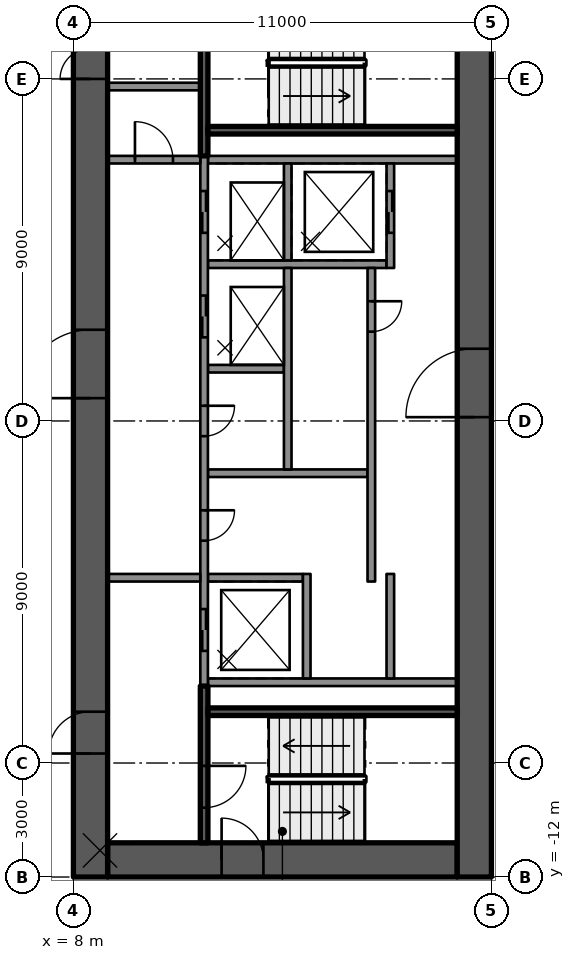
"""IFC4 building model, lengths in metres.
Left out: names, types, materials, properties, quantities, classifications, styles, units other than length and angle.
Written with IfcOpenShell. Run it as: python <this file> out.ifc"""

import sys

from ifc_helpers import new_model, si_unit, direction, frame, frame_2d, origin, place, context, subcontext, project, spatial, rectangle, extrude, element, fill, save


model = new_model("IFC4")
c1 = context("Model", 3, precision=1e-05, world=origin(), true_north=direction((0.0, 1.0)))
c2 = subcontext(c1, "Body", "Model", "MODEL_VIEW")
j1 = project(units=[si_unit("LENGTHUNIT", "METRE"), si_unit("PLANEANGLEUNIT", "RADIAN")], contexts=[c1])
p1 = place(None, origin())
s1 = spatial("IfcSite", under=j1, at=p1, CompositionType="ELEMENT")
p2 = place(p1, origin())
s2 = spatial("IfcBuilding", under=s1, at=p2, CompositionType="ELEMENT")
p3 = place(p2, frame((0.0, 0.0, 289.4)))
s3 = spatial("IfcBuildingStorey", under=s2, at=p3, CompositionType="ELEMENT", Elevation=289.4)
p4 = place(p3, frame((8.9, -11.55, 0.0), z_axis=(0.0, 0.0, 1.0), x_axis=(1.0, 0.0, 0.0)))
e1 = element("IfcWall", 1, at=p4, inside=s3, PredefinedType="SHEAR", context=c2, shape_type="SweptSolid", body=[
    extrude(rectangle(XDim=9.2, YDim=0.9, at=frame_2d((4.6, 0.0))), origin(), (0.0, 0.0, 1.0), 3.5),
])
p5 = place(p4, frame((3.0, 0.0, 0.0)))
e2 = element("IfcOpeningElement", 2, at=p5, cuts=e1, PredefinedType="OPENING", context=c2, shape_type="SweptSolid", body=[
    extrude(rectangle(XDim=1.1, YDim=2.1, at=frame_2d((0.55, 1.05))), frame((0.0, 0.46, 0.0), z_axis=(0.0, -1.0, 0.0), x_axis=(1.0, 0.0, 0.0)), (0.0, 0.0, 1.0), 0.92),
])
p6 = place(p3, frame((8.45, -12.0, 0.0), z_axis=(0.0, 0.0, 1.0), x_axis=(0.0, 1.0, 0.0)))
e3 = element("IfcWall", 3, at=p6, inside=s3, PredefinedType="SHEAR", context=c2, shape_type="SweptSolid", body=[
    extrude(rectangle(XDim=24.0, YDim=0.9, at=frame_2d((12.0, 0.0))), origin(), (0.0, 0.0, 1.0), 3.5),
])
p7 = place(p6, frame((12.6, 0.0, 0.0)))
e4 = element("IfcOpeningElement", 4, at=p7, cuts=e3, PredefinedType="OPENING", context=c2, shape_type="SweptSolid", body=[
    extrude(rectangle(XDim=1.8, YDim=2.1, at=frame_2d((0.9, 1.05))), frame((0.0, 0.46, 0.0), z_axis=(0.0, -1.0, 0.0), x_axis=(1.0, 0.0, 0.0)), (0.0, 0.0, 1.0), 0.92),
])
p8 = place(p6, frame((3.25, 0.0, 0.0)))
e5 = element("IfcOpeningElement", 5, at=p8, cuts=e3, PredefinedType="OPENING", context=c2, shape_type="SweptSolid", body=[
    extrude(rectangle(XDim=1.1, YDim=2.1, at=frame_2d((0.55, 1.05))), frame((0.0, 0.46, 0.0), z_axis=(0.0, -1.0, 0.0), x_axis=(1.0, 0.0, 0.0)), (0.0, 0.0, 1.0), 0.92),
])
p9 = place(p6, frame((21.0, 0.0, 0.0)))
e6 = element("IfcOpeningElement", 6, at=p9, cuts=e3, PredefinedType="OPENING", context=c2, shape_type="SweptSolid", body=[
    extrude(rectangle(XDim=0.8, YDim=2.1, at=frame_2d((0.4, 1.05))), frame((0.0, 0.46, 0.0), z_axis=(0.0, -1.0, 0.0), x_axis=(1.0, 0.0, 0.0)), (0.0, 0.0, 1.0), 0.92),
])
p10 = place(p3, frame((18.55, -12.0, 0.0), z_axis=(0.0, 0.0, 1.0), x_axis=(0.0, 1.0, 0.0)))
e7 = element("IfcWall", 7, at=p10, inside=s3, PredefinedType="SHEAR", context=c2, shape_type="SweptSolid", body=[
    extrude(rectangle(XDim=24.0, YDim=0.9, at=frame_2d((12.0, 0.0))), origin(), (0.0, 0.0, 1.0), 3.5),
])
p11 = place(p10, frame((12.1, 0.0, 0.0)))
e8 = element("IfcOpeningElement", 8, at=p11, cuts=e7, PredefinedType="OPENING", context=c2, shape_type="SweptSolid", body=[
    extrude(rectangle(XDim=1.8, YDim=2.1, at=frame_2d((0.9, 1.05))), frame((0.0, 0.46, 0.0), z_axis=(0.0, -1.0, 0.0), x_axis=(1.0, 0.0, 0.0)), (0.0, 0.0, 1.0), 0.92),
])
for number, where, z_axis, x_axis in (
    (9, (11.54, -6.875, 0.0), (0.0, 0.0, 1.0), (1.0, 0.0, 0.0)),
    (10, (11.54, 6.875, 0.0), (0.0, 0.0, 1.0), (1.0, 0.0, 0.0)),
):
    element("IfcWall", number, at=place(p3, frame(where, z_axis=z_axis, x_axis=x_axis)), inside=s3, PredefinedType="SOLIDWALL", context=c2, shape_type="SweptSolid", body=[
        extrude(rectangle(XDim=6.56, YDim=0.2, at=frame_2d((3.28, 0.0))), origin(), (0.0, 0.0, 1.0), 3.09),
    ])
p12 = place(p3, frame((11.54, 4.125, 0.0), z_axis=(0.0, 0.0, 1.0), x_axis=(1.0, 0.0, 0.0)))
e11 = element("IfcWall", 11, at=p12, inside=s3, PredefinedType="SOLIDWALL", context=c2, shape_type="SweptSolid", body=[
    extrude(rectangle(XDim=4.7, YDim=0.2, at=frame_2d((2.35, 0.0))), origin(), (0.0, 0.0, 1.0), 3.09),
])
p13 = place(p3, frame((11.54, 1.375, 0.0), z_axis=(0.0, 0.0, 1.0), x_axis=(1.0, 0.0, 0.0)))
e12 = element("IfcWall", 12, at=p13, inside=s3, PredefinedType="SOLIDWALL", context=c2, shape_type="SweptSolid", body=[
    extrude(rectangle(XDim=2.0, YDim=0.2, at=frame_2d((1.0, 0.0))), origin(), (0.0, 0.0, 1.0), 3.09),
])
p14 = place(p3, frame((11.54, -1.375, 0.0), z_axis=(0.0, 0.0, 1.0), x_axis=(1.0, 0.0, 0.0)))
e13 = element("IfcWall", 13, at=p14, inside=s3, PredefinedType="SOLIDWALL", context=c2, shape_type="SweptSolid", body=[
    extrude(rectangle(XDim=4.2, YDim=0.2, at=frame_2d((2.1, 0.0))), origin(), (0.0, 0.0, 1.0), 3.09),
])
p15 = place(p3, frame((11.54, -4.125, 0.0), z_axis=(0.0, 0.0, 1.0), x_axis=(1.0, 0.0, 0.0)))
e14 = element("IfcWall", 14, at=p15, inside=s3, PredefinedType="SOLIDWALL", context=c2, shape_type="SweptSolid", body=[
    extrude(rectangle(XDim=2.5, YDim=0.2, at=frame_2d((1.25, 0.0))), origin(), (0.0, 0.0, 1.0), 3.09),
])
p16 = place(p3, frame((11.44, 6.975, 0.0), z_axis=(0.0, 0.0, 1.0), x_axis=(0.0, -1.0, 0.0)))
e15 = element("IfcWall", 15, at=p16, inside=s3, PredefinedType="SOLIDWALL", context=c2, shape_type="SweptSolid", body=[
    extrude(rectangle(XDim=13.95, YDim=0.2, at=frame_2d((6.975, 0.0))), origin(), (0.0, 0.0, 1.0), 3.09),
])
p17 = place(p16, frame((0.925, 0.0, 0.0)))
e16 = element("IfcOpeningElement", 16, at=p17, cuts=e15, PredefinedType="OPENING", context=c2, shape_type="SweptSolid", body=[
    extrude(rectangle(XDim=1.1, YDim=2.1, at=frame_2d((0.55, 1.05))), frame((0.0, 0.11, 0.0), z_axis=(0.0, -1.0, 0.0), x_axis=(1.0, 0.0, 0.0)), (0.0, 0.0, 1.0), 0.22),
])
p18 = place(p16, frame((3.675, 0.0, 0.0)))
e17 = element("IfcOpeningElement", 17, at=p18, cuts=e15, PredefinedType="OPENING", context=c2, shape_type="SweptSolid", body=[
    extrude(rectangle(XDim=1.1, YDim=2.1, at=frame_2d((0.55, 1.05))), frame((0.0, 0.11, 0.0), z_axis=(0.0, -1.0, 0.0), x_axis=(1.0, 0.0, 0.0)), (0.0, 0.0, 1.0), 0.22),
])
p19 = place(p16, frame((11.925, 0.0, 0.0)))
e18 = element("IfcOpeningElement", 18, at=p19, cuts=e15, PredefinedType="OPENING", context=c2, shape_type="SweptSolid", body=[
    extrude(rectangle(XDim=1.1, YDim=2.1, at=frame_2d((0.55, 1.05))), frame((0.0, 0.11, 0.0), z_axis=(0.0, -1.0, 0.0), x_axis=(1.0, 0.0, 0.0)), (0.0, 0.0, 1.0), 0.22),
])
p20 = place(p16, frame((6.575, 0.0, 0.0)))
e19 = element("IfcOpeningElement", 19, at=p20, cuts=e15, PredefinedType="OPENING", context=c2, shape_type="SweptSolid", body=[
    extrude(rectangle(XDim=0.8, YDim=2.1, at=frame_2d((0.4, 1.05))), frame((0.0, 0.11, 0.0), z_axis=(0.0, -1.0, 0.0), x_axis=(1.0, 0.0, 0.0)), (0.0, 0.0, 1.0), 0.22),
])
p21 = place(p16, frame((9.325, 0.0, 0.0)))
e20 = element("IfcOpeningElement", 20, at=p21, cuts=e15, PredefinedType="OPENING", context=c2, shape_type="SweptSolid", body=[
    extrude(rectangle(XDim=0.8, YDim=2.1, at=frame_2d((0.4, 1.05))), frame((0.0, 0.11, 0.0), z_axis=(0.0, -1.0, 0.0), x_axis=(1.0, 0.0, 0.0)), (0.0, 0.0, 1.0), 0.22),
])
p22 = place(p3, frame((13.64, 6.775, 0.0), z_axis=(0.0, 0.0, 1.0), x_axis=(0.0, -1.0, 0.0)))
e21 = element("IfcWall", 21, at=p22, inside=s3, PredefinedType="SOLIDWALL", context=c2, shape_type="SweptSolid", body=[
    extrude(rectangle(XDim=2.55, YDim=0.2, at=frame_2d((1.275, 0.0))), origin(), (0.0, 0.0, 1.0), 3.09),
])
p23 = place(p3, frame((13.64, 4.025, 0.0), z_axis=(0.0, 0.0, 1.0), x_axis=(0.0, -1.0, 0.0)))
e22 = element("IfcWall", 22, at=p23, inside=s3, PredefinedType="SOLIDWALL", context=c2, shape_type="SweptSolid", body=[
    extrude(rectangle(XDim=5.3, YDim=0.2, at=frame_2d((2.65, 0.0))), origin(), (0.0, 0.0, 1.0), 3.09),
])
p24 = place(p3, frame((14.14, -4.025, 0.0), z_axis=(0.0, 0.0, 1.0), x_axis=(0.0, -1.0, 0.0)))
e23 = element("IfcWall", 23, at=p24, inside=s3, PredefinedType="SOLIDWALL", context=c2, shape_type="SweptSolid", body=[
    extrude(rectangle(XDim=2.75, YDim=0.2, at=frame_2d((1.375, 0.0))), origin(), (0.0, 0.0, 1.0), 3.09),
])
p25 = place(p3, frame((16.34, 6.775, 0.0), z_axis=(0.0, 0.0, 1.0), x_axis=(0.0, -1.0, 0.0)))
e24 = element("IfcWall", 24, at=p25, inside=s3, PredefinedType="SOLIDWALL", context=c2, shape_type="SweptSolid", body=[
    extrude(rectangle(XDim=2.75, YDim=0.2, at=frame_2d((1.375, 0.0))), origin(), (0.0, 0.0, 1.0), 3.09),
])
p26 = place(p25, frame((0.725, 0.0, 0.0)))
e25 = element("IfcOpeningElement", 25, at=p26, cuts=e24, PredefinedType="OPENING", context=c2, shape_type="SweptSolid", body=[
    extrude(rectangle(XDim=1.1, YDim=2.1, at=frame_2d((0.55, 1.05))), frame((0.0, 0.11, 0.0), z_axis=(0.0, -1.0, 0.0), x_axis=(1.0, 0.0, 0.0)), (0.0, 0.0, 1.0), 0.22),
])
p27 = place(p3, frame((15.84, 4.025, 0.0), z_axis=(0.0, 0.0, 1.0), x_axis=(0.0, -1.0, 0.0)))
e26 = element("IfcWall", 26, at=p27, inside=s3, PredefinedType="SOLIDWALL", context=c2, shape_type="SweptSolid", body=[
    extrude(rectangle(XDim=8.25, YDim=0.2, at=frame_2d((4.125, 0.0))), origin(), (0.0, 0.0, 1.0), 3.09),
])
p28 = place(p27, frame((0.875, 0.0, 0.0)))
e27 = element("IfcOpeningElement", 27, at=p28, cuts=e26, PredefinedType="OPENING", context=c2, shape_type="SweptSolid", body=[
    extrude(rectangle(XDim=0.8, YDim=2.1, at=frame_2d((0.4, 1.05))), frame((0.0, 0.11, 0.0), z_axis=(0.0, -1.0, 0.0), x_axis=(1.0, 0.0, 0.0)), (0.0, 0.0, 1.0), 0.22),
])
p29 = place(p3, frame((16.34, -4.025, 0.0), z_axis=(0.0, 0.0, 1.0), x_axis=(0.0, -1.0, 0.0)))
e28 = element("IfcWall", 28, at=p29, inside=s3, PredefinedType="SOLIDWALL", context=c2, shape_type="SweptSolid", body=[
    extrude(rectangle(XDim=2.75, YDim=0.2, at=frame_2d((1.375, 0.0))), origin(), (0.0, 0.0, 1.0), 3.09),
])
p30 = place(p3, frame((11.44, -6.975, 0.0), z_axis=(0.0, 0.0, 1.0), x_axis=(0.0, -1.0, 0.0)))
e29 = element("IfcWall", 29, at=p30, inside=s3, PredefinedType="SOLIDWALL", context=c2, shape_type="SweptSolid", body=[
    extrude(rectangle(XDim=4.125, YDim=0.2, at=frame_2d((2.062, 0.0))), origin(), (0.0, 0.0, 1.0), 3.09),
])
p31 = place(p30, frame((2.1, 0.0, 0.0)))
e30 = element("IfcOpeningElement", 30, at=p31, cuts=e29, PredefinedType="OPENING", context=c2, shape_type="SweptSolid", body=[
    extrude(rectangle(XDim=1.1, YDim=2.1, at=frame_2d((0.55, 1.05))), frame((0.0, 0.11, 0.0), z_axis=(0.0, -1.0, 0.0), x_axis=(1.0, 0.0, 0.0)), (0.0, 0.0, 1.0), 0.22),
])
p32 = place(p3, frame((11.54, -7.65, 0.0), z_axis=(0.0, 0.0, 1.0), x_axis=(1.0, 0.0, 0.0)))
e31 = element("IfcWall", 31, at=p32, inside=s3, PredefinedType="SOLIDWALL", context=c2, shape_type="SweptSolid", body=[
    extrude(rectangle(XDim=6.56, YDim=0.2, at=frame_2d((3.28, 0.0))), origin(), (0.0, 0.0, 1.0), 3.09),
])
p33 = place(p3, frame((11.44, 11.1, 0.0), z_axis=(0.0, 0.0, 1.0), x_axis=(0.0, -1.0, 0.0)))
e32 = element("IfcWall", 32, at=p33, inside=s3, PredefinedType="SOLIDWALL", context=c2, shape_type="SweptSolid", body=[
    extrude(rectangle(XDim=4.125, YDim=0.2, at=frame_2d((2.062, 0.0))), origin(), (0.0, 0.0, 1.0), 3.09),
])
p34 = place(p3, frame((11.54, 7.65, 0.0), z_axis=(0.0, 0.0, 1.0), x_axis=(1.0, 0.0, 0.0)))
e33 = element("IfcWall", 33, at=p34, inside=s3, PredefinedType="SOLIDWALL", context=c2, shape_type="SweptSolid", body=[
    extrude(rectangle(XDim=6.56, YDim=0.2, at=frame_2d((3.28, 0.0))), origin(), (0.0, 0.0, 1.0), 3.09),
])
p35 = place(p3, frame((8.9, -4.125, 0.0), z_axis=(0.0, 0.0, 1.0), x_axis=(1.0, 0.0, 0.0)))
e34 = element("IfcWall", 34, at=p35, inside=s3, PredefinedType="PARTITIONING", context=c2, shape_type="SweptSolid", body=[
    extrude(rectangle(XDim=2.44, YDim=0.2, at=frame_2d((1.22, 0.0))), origin(), (0.0, 0.0, 1.0), 3.09),
])
p36 = place(p3, frame((8.9, 6.875, 0.0), z_axis=(0.0, 0.0, 1.0), x_axis=(1.0, 0.0, 0.0)))
e35 = element("IfcWall", 35, at=p36, inside=s3, PredefinedType="PARTITIONING", context=c2, shape_type="SweptSolid", body=[
    extrude(rectangle(XDim=2.44, YDim=0.2, at=frame_2d((1.22, 0.0))), origin(), (0.0, 0.0, 1.0), 3.09),
])
p37 = place(p36, frame((0.72, 0.0, 0.0)))
e36 = element("IfcOpeningElement", 36, at=p37, cuts=e35, PredefinedType="OPENING", context=c2, shape_type="SweptSolid", body=[
    extrude(rectangle(XDim=1.0, YDim=2.1, at=frame_2d((0.5, 1.05))), frame((0.0, 0.11, 0.0), z_axis=(0.0, -1.0, 0.0), x_axis=(1.0, 0.0, 0.0)), (0.0, 0.0, 1.0), 0.22),
])
p38 = place(p3, frame((8.9, 8.8, 0.0), z_axis=(0.0, 0.0, 1.0), x_axis=(1.0, 0.0, 0.0)))
e37 = element("IfcWall", 37, at=p38, inside=s3, PredefinedType="PARTITIONING", context=c2, shape_type="SweptSolid", body=[
    extrude(rectangle(XDim=2.44, YDim=0.2, at=frame_2d((1.22, 0.0))), origin(), (0.0, 0.0, 1.0), 3.09),
])
p39 = place(p17, origin())
e38 = element("IfcDoor", 38, at=p39, inside=s3, OperationType="DOUBLE_DOOR_SLIDING", PredefinedType="DOOR", context=c2, shape_type="SweptSolid", body=[
    extrude(rectangle(XDim=1.1, YDim=2.1, at=frame_2d((0.55, 1.05))), frame((0.0, 0.025, 0.0), z_axis=(0.0, -1.0, 0.0), x_axis=(1.0, 0.0, 0.0)), (0.0, 0.0, 1.0), 0.05),
])
fill(e16, e38)
p40 = place(p26, origin())
e39 = element("IfcDoor", 39, at=p40, inside=s3, OperationType="DOUBLE_DOOR_SLIDING", PredefinedType="DOOR", context=c2, shape_type="SweptSolid", body=[
    extrude(rectangle(XDim=1.1, YDim=2.1, at=frame_2d((0.55, 1.05))), frame((0.0, 0.025, 0.0), z_axis=(0.0, -1.0, 0.0), x_axis=(1.0, 0.0, 0.0)), (0.0, 0.0, 1.0), 0.05),
])
fill(e25, e39)
p41 = place(p18, origin())
e40 = element("IfcDoor", 40, at=p41, inside=s3, OperationType="DOUBLE_DOOR_SLIDING", PredefinedType="DOOR", context=c2, shape_type="SweptSolid", body=[
    extrude(rectangle(XDim=1.1, YDim=2.1, at=frame_2d((0.55, 1.05))), frame((0.0, 0.025, 0.0), z_axis=(0.0, -1.0, 0.0), x_axis=(1.0, 0.0, 0.0)), (0.0, 0.0, 1.0), 0.05),
])
fill(e17, e40)
p42 = place(p19, origin())
e41 = element("IfcDoor", 41, at=p42, inside=s3, OperationType="DOUBLE_DOOR_SLIDING", PredefinedType="DOOR", context=c2, shape_type="SweptSolid", body=[
    extrude(rectangle(XDim=1.1, YDim=2.1, at=frame_2d((0.55, 1.05))), frame((0.0, 0.025, 0.0), z_axis=(0.0, -1.0, 0.0), x_axis=(1.0, 0.0, 0.0)), (0.0, 0.0, 1.0), 0.05),
])
fill(e18, e41)
p43 = place(p28, origin())
e42 = element("IfcDoor", 42, at=p43, inside=s3, OperationType="SINGLE_SWING_LEFT", PredefinedType="DOOR", context=c2, shape_type="SweptSolid", body=[
    extrude(rectangle(XDim=0.8, YDim=2.1, at=frame_2d((0.4, 1.05))), frame((0.0, 0.025, 0.0), z_axis=(0.0, -1.0, 0.0), x_axis=(1.0, 0.0, 0.0)), (0.0, 0.0, 1.0), 0.05),
])
fill(e27, e42)
p44 = place(p20, origin())
e43 = element("IfcDoor", 43, at=p44, inside=s3, OperationType="SINGLE_SWING_LEFT", PredefinedType="DOOR", context=c2, shape_type="SweptSolid", body=[
    extrude(rectangle(XDim=0.8, YDim=2.1, at=frame_2d((0.4, 1.05))), frame((0.0, 0.025, 0.0), z_axis=(0.0, -1.0, 0.0), x_axis=(1.0, 0.0, 0.0)), (0.0, 0.0, 1.0), 0.05),
])
fill(e19, e43)
p45 = place(p21, origin())
e44 = element("IfcDoor", 44, at=p45, inside=s3, OperationType="SINGLE_SWING_LEFT", PredefinedType="DOOR", context=c2, shape_type="SweptSolid", body=[
    extrude(rectangle(XDim=0.8, YDim=2.1, at=frame_2d((0.4, 1.05))), frame((0.0, 0.025, 0.0), z_axis=(0.0, -1.0, 0.0), x_axis=(1.0, 0.0, 0.0)), (0.0, 0.0, 1.0), 0.05),
])
fill(e20, e44)
p46 = place(p7, origin())
e45 = element("IfcDoor", 45, at=p46, inside=s3, OperationType="SINGLE_SWING_RIGHT", PredefinedType="DOOR", context=c2, shape_type="SweptSolid", body=[
    extrude(rectangle(XDim=1.8, YDim=2.1, at=frame_2d((0.9, 1.05))), frame((0.0, 0.025, 0.0), z_axis=(0.0, -1.0, 0.0), x_axis=(1.0, 0.0, 0.0)), (0.0, 0.0, 1.0), 0.05),
])
fill(e4, e45)
p47 = place(p11, origin())
e46 = element("IfcDoor", 46, at=p47, inside=s3, OperationType="SINGLE_SWING_RIGHT", PredefinedType="DOOR", context=c2, shape_type="SweptSolid", body=[
    extrude(rectangle(XDim=1.8, YDim=2.1, at=frame_2d((0.9, 1.05))), frame((0.0, 0.025, 0.0), z_axis=(0.0, -1.0, 0.0), x_axis=(1.0, 0.0, 0.0)), (0.0, 0.0, 1.0), 0.05),
])
fill(e8, e46)
p48 = place(p8, origin())
e47 = element("IfcDoor", 47, at=p48, inside=s3, OperationType="SINGLE_SWING_LEFT", PredefinedType="DOOR", context=c2, shape_type="SweptSolid", body=[
    extrude(rectangle(XDim=1.1, YDim=2.1, at=frame_2d((0.55, 1.05))), frame((0.0, 0.025, 0.0), z_axis=(0.0, -1.0, 0.0), x_axis=(1.0, 0.0, 0.0)), (0.0, 0.0, 1.0), 0.05),
])
fill(e5, e47)
p49 = place(p5, origin())
e48 = element("IfcDoor", 48, at=p49, inside=s3, OperationType="SINGLE_SWING_LEFT", PredefinedType="DOOR", context=c2, shape_type="SweptSolid", body=[
    extrude(rectangle(XDim=1.1, YDim=2.1, at=frame_2d((0.55, 1.05))), frame((0.0, 0.025, 0.0), z_axis=(0.0, -1.0, 0.0), x_axis=(1.0, 0.0, 0.0)), (0.0, 0.0, 1.0), 0.05),
])
fill(e2, e48)
p50 = place(p31, origin())
e49 = element("IfcDoor", 49, at=p50, inside=s3, OperationType="SINGLE_SWING_RIGHT", PredefinedType="DOOR", context=c2, shape_type="SweptSolid", body=[
    extrude(rectangle(XDim=1.1, YDim=2.1, at=frame_2d((0.55, 1.05))), frame((0.0, 0.025, 0.0), z_axis=(0.0, -1.0, 0.0), x_axis=(1.0, 0.0, 0.0)), (0.0, 0.0, 1.0), 0.05),
])
fill(e30, e49)
p51 = place(p9, origin())
e50 = element("IfcDoor", 50, at=p51, inside=s3, OperationType="SINGLE_SWING_RIGHT", PredefinedType="DOOR", context=c2, shape_type="SweptSolid", body=[
    extrude(rectangle(XDim=0.8, YDim=2.1, at=frame_2d((0.4, 1.05))), frame((0.0, 0.025, 0.0), z_axis=(0.0, -1.0, 0.0), x_axis=(1.0, 0.0, 0.0)), (0.0, 0.0, 1.0), 0.05),
])
fill(e6, e50)
p52 = place(p37, origin())
e51 = element("IfcDoor", 51, at=p52, inside=s3, OperationType="SINGLE_SWING_RIGHT", PredefinedType="DOOR", context=c2, shape_type="SweptSolid", body=[
    extrude(rectangle(XDim=1.0, YDim=2.1, at=frame_2d((0.5, 1.05))), frame((0.0, 0.025, 0.0), z_axis=(0.0, -1.0, 0.0), x_axis=(1.0, 0.0, 0.0)), (0.0, 0.0, 1.0), 0.05),
])
fill(e36, e51)
save(model, sys.argv[1])
